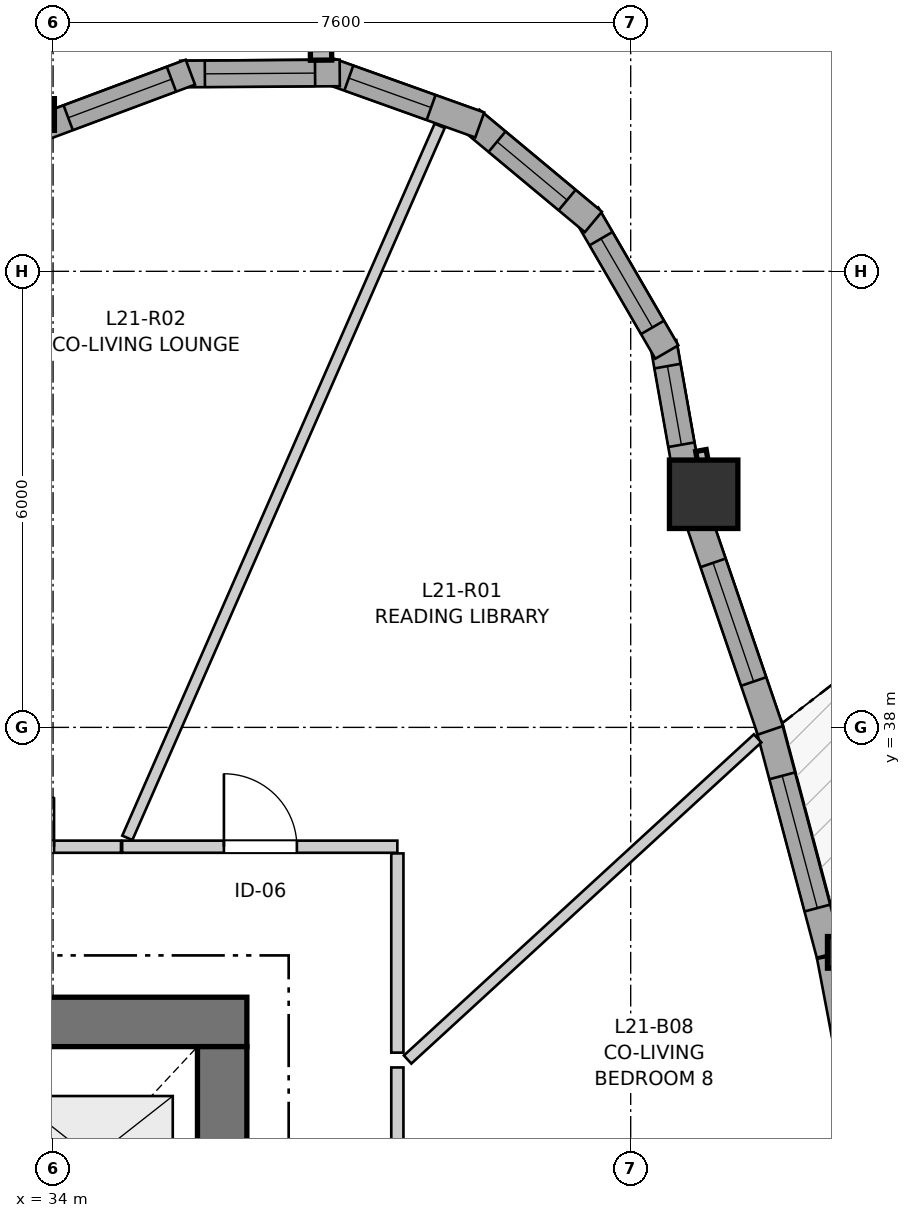
"""IFC4 building model, lengths in metres.
Left out: names, types, materials, properties, quantities, classifications, styles, units other than length and angle.
Written with IfcOpenShell. Run it as: python <this file> out.ifc"""

import sys

from ifc_helpers import new_model, si_unit, direction, frame, frame_2d, origin, origin_2d, place, context, subcontext, project, spatial, rectangle, i_section, extrude, source, transform, mapped, element, fill, save


model = new_model("IFC4")
c1 = context("Model", 3, precision=1e-05, world=origin(), true_north=direction((0.0, 1.0)))
c2 = subcontext(c1, "Body", "Model", "MODEL_VIEW")
j1 = project(units=[si_unit("LENGTHUNIT", "METRE"), si_unit("PLANEANGLEUNIT", "RADIAN")], contexts=[c1])
p1 = place(None, origin())
s1 = spatial("IfcSite", under=j1, at=p1, CompositionType="ELEMENT")
p2 = place(p1, origin())
s2 = spatial("IfcBuilding", under=s1, at=p2, CompositionType="ELEMENT")
p3 = place(p2, frame((0.0, 0.0, 73.6)))
s3 = spatial("IfcBuildingStorey", under=s2, at=p3, CompositionType="ELEMENT", Elevation=73.6)
p4 = place(p3, frame((36.55, 34.125, 0.0), z_axis=(0.0, 0.0, 1.0), x_axis=(-1.0, 0.0, 0.0)))
e1 = element("IfcWall", 1, at=p4, inside=s3, PredefinedType="SHEAR", context=c2, shape_type="SweptSolid", body=[
    extrude(rectangle(XDim=12.4, YDim=0.65, at=frame_2d((6.2, 0.0))), origin(), (0.0, 0.0, 1.0), 2.95),
])
p5 = place(p3, frame((36.225, 18.2, 0.0), z_axis=(0.0, 0.0, 1.0), x_axis=(0.0, 1.0, 0.0)))
e2 = element("IfcWall", 2, at=p5, inside=s3, PredefinedType="SHEAR", context=c2, shape_type="SweptSolid", body=[
    extrude(rectangle(XDim=15.6, YDim=0.65, at=frame_2d((7.8, 0.0))), origin(), (0.0, 0.0, 1.0), 2.95),
])
p6 = place(p5, frame((4.25, 0.0, 0.0)))
e3 = element("IfcOpeningElement", 3, at=p6, cuts=e2, PredefinedType="OPENING", context=c2, shape_type="SweptSolid", body=[
    extrude(rectangle(XDim=1.1, YDim=2.15, at=frame_2d((0.55, 1.075))), frame((0.0, 0.335, 0.0), z_axis=(0.0, -1.0, 0.0), x_axis=(1.0, 0.0, 0.0)), (0.0, 0.0, 1.0), 0.67),
])
p7 = place(p5, frame((10.25, 0.0, 0.0)))
e4 = element("IfcOpeningElement", 4, at=p7, cuts=e2, PredefinedType="OPENING", context=c2, shape_type="SweptSolid", body=[
    extrude(rectangle(XDim=1.1, YDim=2.15, at=frame_2d((0.55, 1.075))), frame((0.0, 0.335, 0.0), z_axis=(0.0, -1.0, 0.0), x_axis=(1.0, 0.0, 0.0)), (0.0, 0.0, 1.0), 0.67),
])
m1 = source(origin(), c2, "Body", "SweptSolid", [
    extrude(i_section(OverallWidth=0.406, OverallDepth=0.416, WebThickness=0.027, FlangeThickness=0.044, FilletRadius=0.015, at=origin_2d()), origin(), (0.0, 0.0, 1.0), 2.95),
])
p8 = place(p3, frame((44.392, 35.04, 0.0), z_axis=(0.0, 0.0, 1.0), x_axis=(1.0, 0.0, 0.0)))
e5 = element("IfcColumn", 5, at=p8, inside=s3, PredefinedType="PILASTER", context=c2, shape_type="MappedRepresentation", body=[
    mapped(m1, transform((0.0, 0.0, 0.0), x_axis=(1.0, 0.0, 0.0), y_axis=(0.0, 1.0, 0.0), z_axis=(0.0, 0.0, 1.0), scale=1.0)),
])
m2 = source(origin(), c2, "Body", "SweptSolid", [
    extrude(rectangle(XDim=0.9, YDim=0.9, at=origin_2d()), origin(), (0.0, 0.0, 1.0), 2.95),
])
p9 = place(p3, frame((42.56, 41.067, 0.0), z_axis=(0.0, 0.0, 1.0), x_axis=(1.0, 0.0, 0.0)))
e6 = element("IfcColumn", 6, at=p9, inside=s3, PredefinedType="COLUMN", context=c2, shape_type="MappedRepresentation", body=[
    mapped(m2, transform((0.0, 0.0, 0.0), x_axis=(1.0, 0.0, 0.0), y_axis=(0.0, 1.0, 0.0), z_axis=(0.0, 0.0, 1.0), scale=1.0)),
])
p10 = place(p3, frame((33.815, 46.063, 0.0), z_axis=(0.0, 0.0, 1.0), x_axis=(1.0, 0.0, 0.0)))
e7 = element("IfcColumn", 7, at=p10, inside=s3, PredefinedType="PILASTER", context=c2, shape_type="MappedRepresentation", body=[
    mapped(m1, transform((0.0, 0.0, 0.0), x_axis=(1.0, 0.0, 0.0), y_axis=(0.0, 1.0, 0.0), z_axis=(0.0, 0.0, 1.0), scale=1.0)),
])
p11 = place(p3, frame((44.8, 31.957, 0.0), z_axis=(0.0, 0.0, 1.0), x_axis=(-0.186672102023, 0.982422274954, 0.0)))
e8 = element("IfcWall", 8, at=p11, inside=s3, PredefinedType="SOLIDWALL", context=c2, shape_type="SweptSolid", body=[
    extrude(rectangle(XDim=3.085, YDim=0.35, at=frame_2d((1.542, 0.0))), origin(), (0.0, 0.0, 1.0), 2.48),
])
p12 = place(p11, frame((0.978, 0.0, 0.82)))
e9 = element("IfcOpeningElement", 9, at=p12, cuts=e8, PredefinedType="OPENING", context=c2, shape_type="SweptSolid", body=[
    extrude(rectangle(XDim=1.15, YDim=1.2, at=frame_2d((0.575, 0.6))), frame((0.0, 0.185, 0.0), z_axis=(0.0, -1.0, 0.0), x_axis=(1.0, 0.0, 0.0)), (0.0, 0.0, 1.0), 0.37),
])
p13 = place(p3, frame((44.218, 35.014, 0.0), z_axis=(0.0, 0.0, 1.0), x_axis=(-0.25705209467, 0.96639754792, 0.0)))
e10 = element("IfcWall", 10, at=p13, inside=s3, PredefinedType="SOLIDWALL", context=c2, shape_type="SweptSolid", body=[
    extrude(rectangle(XDim=3.136, YDim=0.35, at=frame_2d((1.568, 0.0))), origin(), (0.0, 0.0, 1.0), 2.48),
])
p14 = place(p13, frame((0.63, 0.0, 0.82)))
e11 = element("IfcOpeningElement", 11, at=p14, cuts=e10, PredefinedType="OPENING", context=c2, shape_type="SweptSolid", body=[
    extrude(rectangle(XDim=1.8, YDim=1.45, at=frame_2d((0.9, 0.725))), frame((0.0, 0.185, 0.0), z_axis=(0.0, -1.0, 0.0), x_axis=(1.0, 0.0, 0.0)), (0.0, 0.0, 1.0), 0.37),
])
p15 = place(p3, frame((43.437, 37.961, 0.0), z_axis=(0.0, 0.0, 1.0), x_axis=(-0.323572555921, 0.946203361363, 0.0)))
e12 = element("IfcWall", 12, at=p15, inside=s3, PredefinedType="SOLIDWALL", context=c2, shape_type="SweptSolid", body=[
    extrude(rectangle(XDim=2.998, YDim=0.35, at=frame_2d((1.499, 0.0))), origin(), (0.0, 0.0, 1.0), 2.48),
])
p16 = place(p15, frame((0.679, 0.0, 0.82)))
e13 = element("IfcOpeningElement", 13, at=p16, cuts=e12, PredefinedType="OPENING", context=c2, shape_type="SweptSolid", body=[
    extrude(rectangle(XDim=1.65, YDim=1.45, at=frame_2d((0.825, 0.725))), frame((0.0, 0.185, 0.0), z_axis=(0.0, -1.0, 0.0), x_axis=(1.0, 0.0, 0.0)), (0.0, 0.0, 1.0), 0.37),
])
p17 = place(p3, frame((42.348, 41.258, 0.0), z_axis=(0.0, 0.0, 1.0), x_axis=(-0.174331490339, 0.984687022092, 0.0)))
e14 = element("IfcWall", 14, at=p17, inside=s3, PredefinedType="SOLIDWALL", context=c2, shape_type="SweptSolid", body=[
    extrude(rectangle(XDim=1.836, YDim=0.35, at=frame_2d((0.918, 0.0))), origin(), (0.0, 0.0, 1.0), 2.48),
])
p18 = place(p17, frame((0.468, 0.0, 0.82)))
e15 = element("IfcOpeningElement", 15, at=p18, cuts=e14, PredefinedType="OPENING", context=c2, shape_type="SweptSolid", body=[
    extrude(rectangle(XDim=1.05, YDim=1.45, at=frame_2d((0.525, 0.725))), frame((0.0, 0.185, 0.0), z_axis=(0.0, -1.0, 0.0), x_axis=(1.0, 0.0, 0.0)), (0.0, 0.0, 1.0), 0.37),
])
p19 = place(p3, frame((42.075, 42.938, 0.0), z_axis=(0.0, 0.0, 1.0), x_axis=(-0.501902596059, 0.864924149315, 0.0)))
e16 = element("IfcWall", 16, at=p19, inside=s3, PredefinedType="SOLIDWALL", context=c2, shape_type="SweptSolid", body=[
    extrude(rectangle(XDim=2.099, YDim=0.35, at=frame_2d((1.049, 0.0))), origin(), (0.0, 0.0, 1.0), 2.48),
])
p20 = place(p19, frame((0.375, 0.0, 0.82)))
e17 = element("IfcOpeningElement", 17, at=p20, cuts=e16, PredefinedType="OPENING", context=c2, shape_type="SweptSolid", body=[
    extrude(rectangle(XDim=1.35, YDim=1.45, at=frame_2d((0.675, 0.725))), frame((0.0, 0.185, 0.0), z_axis=(0.0, -1.0, 0.0), x_axis=(1.0, 0.0, 0.0)), (0.0, 0.0, 1.0), 0.37),
])
p21 = place(p3, frame((41.109, 44.65, 0.0), z_axis=(0.0, 0.0, 1.0), x_axis=(-0.768450068703, 0.639909752942, 0.0)))
e18 = element("IfcWall", 18, at=p21, inside=s3, PredefinedType="SOLIDWALL", context=c2, shape_type="SweptSolid", body=[
    extrude(rectangle(XDim=2.099, YDim=0.35, at=frame_2d((1.049, 0.0))), origin(), (0.0, 0.0, 1.0), 2.48),
])
p22 = place(p21, frame((0.449, 0.0, 0.82)))
e19 = element("IfcOpeningElement", 19, at=p22, cuts=e18, PredefinedType="OPENING", context=c2, shape_type="SweptSolid", body=[
    extrude(rectangle(XDim=1.2, YDim=1.45, at=frame_2d((0.6, 0.725))), frame((0.0, 0.185, 0.0), z_axis=(0.0, -1.0, 0.0), x_axis=(1.0, 0.0, 0.0)), (0.0, 0.0, 1.0), 0.37),
])
p23 = place(p3, frame((39.614, 45.925, 0.0), z_axis=(0.0, 0.0, 1.0), x_axis=(-0.941486401639, 0.33705096874, 0.0)))
e20 = element("IfcWall", 20, at=p23, inside=s3, PredefinedType="SOLIDWALL", context=c2, shape_type="SweptSolid", body=[
    extrude(rectangle(XDim=2.099, YDim=0.35, at=frame_2d((1.05, 0.0))), origin(), (0.0, 0.0, 1.0), 2.48),
])
p24 = place(p23, frame((0.68, 0.0, 0.82)))
e21 = element("IfcOpeningElement", 21, at=p24, cuts=e20, PredefinedType="OPENING", context=c2, shape_type="SweptSolid", body=[
    extrude(rectangle(XDim=1.15, YDim=1.2, at=frame_2d((0.575, 0.6))), frame((0.0, 0.185, 0.0), z_axis=(0.0, -1.0, 0.0), x_axis=(1.0, 0.0, 0.0)), (0.0, 0.0, 1.0), 0.37),
])
p25 = place(p3, frame((37.772, 46.61, 0.0), z_axis=(0.0, 0.0, 1.0), x_axis=(-0.999976451414, -0.006862697526, 0.0)))
e22 = element("IfcWall", 22, at=p25, inside=s3, PredefinedType="SOLIDWALL", context=c2, shape_type="SweptSolid", body=[
    extrude(rectangle(XDim=2.099, YDim=0.35, at=frame_2d((1.049, 0.0))), origin(), (0.0, 0.0, 1.0), 2.48),
])
p26 = place(p25, frame((0.324, 0.0, 0.82)))
e23 = element("IfcOpeningElement", 23, at=p26, cuts=e22, PredefinedType="OPENING", context=c2, shape_type="SweptSolid", body=[
    extrude(rectangle(XDim=1.45, YDim=1.25, at=frame_2d((0.725, 0.625))), frame((0.0, 0.185, 0.0), z_axis=(0.0, -1.0, 0.0), x_axis=(1.0, 0.0, 0.0)), (0.0, 0.0, 1.0), 0.37),
])
p27 = place(p3, frame((35.806, 46.62, 0.0), z_axis=(0.0, 0.0, 1.0), x_axis=(-0.936863987578, -0.34969396446, 0.0)))
e24 = element("IfcWall", 24, at=p27, inside=s3, PredefinedType="SOLIDWALL", context=c2, shape_type="SweptSolid", body=[
    extrude(rectangle(XDim=2.041, YDim=0.35, at=frame_2d((1.021, 0.0))), origin(), (0.0, 0.0, 1.0), 2.48),
])
p28 = place(p27, frame((0.265, 0.0, 0.82)))
e25 = element("IfcOpeningElement", 25, at=p28, cuts=e24, PredefinedType="OPENING", context=c2, shape_type="SweptSolid", body=[
    extrude(rectangle(XDim=1.45, YDim=1.25, at=frame_2d((0.725, 0.625))), frame((0.0, 0.185, 0.0), z_axis=(0.0, -1.0, 0.0), x_axis=(1.0, 0.0, 0.0)), (0.0, 0.0, 1.0), 0.37),
])
p29 = place(p3, frame((38.53, 33.526, 0.0), z_axis=(0.0, 0.0, 1.0), x_axis=(0.0, -1.0, 0.0)))
e26 = element("IfcWall", 26, at=p29, inside=s3, PredefinedType="PARTITIONING", context=c2, shape_type="SweptSolid", body=[
    extrude(rectangle(XDim=5.472, YDim=0.16, at=frame_2d((2.736, 0.0))), origin(), (0.0, 0.0, 1.0), 2.95),
])
p30 = place(p29, frame((2.278, 0.0, 0.0)))
e27 = element("IfcOpeningElement", 27, at=p30, cuts=e26, PredefinedType="OPENING", context=c2, shape_type="SweptSolid", body=[
    extrude(rectangle(XDim=0.92, YDim=2.1, at=frame_2d((0.46, 1.05))), frame((0.0, 0.09, 0.0), z_axis=(0.0, -1.0, 0.0), x_axis=(1.0, 0.0, 0.0)), (0.0, 0.0, 1.0), 0.18),
])
p31 = place(p3, frame((34.909, 36.43, 0.0), z_axis=(0.0, 0.0, 1.0), x_axis=(1.0, 0.0, 0.0)))
e28 = element("IfcWall", 28, at=p31, inside=s3, PredefinedType="PARTITIONING", context=c2, shape_type="SweptSolid", body=[
    extrude(rectangle(XDim=3.621, YDim=0.16, at=frame_2d((1.811, 0.0))), origin(), (0.0, 0.0, 1.0), 2.588),
])
p32 = place(p31, frame((1.339, 0.0, 0.0)))
e29 = element("IfcOpeningElement", 29, at=p32, cuts=e28, PredefinedType="OPENING", context=c2, shape_type="SweptSolid", body=[
    extrude(rectangle(XDim=0.96, YDim=2.1, at=frame_2d((0.48, 1.05))), frame((0.0, 0.09, 0.0), z_axis=(0.0, -1.0, 0.0), x_axis=(1.0, 0.0, 0.0)), (0.0, 0.0, 1.0), 0.18),
])
p33 = place(p3, frame((31.785, 36.43, 0.0), z_axis=(0.0, 0.0, 1.0), x_axis=(1.0, 0.0, 0.0)))
e30 = element("IfcWall", 30, at=p33, inside=s3, PredefinedType="PARTITIONING", context=c2, shape_type="SweptSolid", body=[
    extrude(rectangle(XDim=3.109, YDim=0.16, at=frame_2d((1.555, 0.0))), origin(), (0.0, 0.0, 1.0), 2.95),
])
p34 = place(p33, frame((0.928, 0.0, 0.0)))
e31 = element("IfcOpeningElement", 31, at=p34, cuts=e30, PredefinedType="OPENING", context=c2, shape_type="SweptSolid", body=[
    extrude(rectangle(XDim=1.3, YDim=2.1, at=frame_2d((0.65, 1.05))), frame((0.0, 0.09, 0.0), z_axis=(0.0, -1.0, 0.0), x_axis=(1.0, 0.0, 0.0)), (0.0, 0.0, 1.0), 0.18),
])
p35 = place(p3, frame((34.977, 36.546, 0.0), z_axis=(0.0, 0.0, 1.0), x_axis=(0.40175384449, 0.915747699117, 0.0)))
e32 = element("IfcWall", 32, at=p35, inside=s3, PredefinedType="PARTITIONING", context=c2, shape_type="SweptSolid", body=[
    extrude(rectangle(XDim=10.23, YDim=0.145, at=frame_2d((5.115, 0.0))), origin(), (0.0, 0.0, 1.0), 2.95),
])
p36 = place(p3, frame((38.665, 33.63, 0.0), z_axis=(0.0, 0.0, 1.0), x_axis=(0.736824900837, 0.676083623161, 0.0)))
e33 = element("IfcWall", 33, at=p36, inside=s3, PredefinedType="PARTITIONING", context=c2, shape_type="SweptSolid", body=[
    extrude(rectangle(XDim=6.25, YDim=0.145, at=frame_2d((3.125, 0.0))), origin(), (0.0, 0.0, 1.0), 2.95),
])
p37 = place(p3, frame((38.53, 33.721, 0.0), z_axis=(0.0, 0.0, 1.0), x_axis=(0.0, 1.0, 0.0)))
e34 = element("IfcWall", 34, at=p37, inside=s3, PredefinedType="PARTITIONING", context=c2, shape_type="SweptSolid", body=[
    extrude(rectangle(XDim=2.621, YDim=0.16, at=frame_2d((1.311, 0.0))), origin(), (0.0, 0.0, 1.0), 2.588),
])
m3 = source(origin(), c2, "Body", "SweptSolid", [
    extrude(rectangle(XDim=1.8, YDim=1.45, at=frame_2d((0.9, 0.725))), frame((0.0, 0.03, 0.0), z_axis=(0.0, -1.0, 0.0), x_axis=(1.0, 0.0, 0.0)), (0.0, 0.0, 1.0), 0.06),
])
p38 = place(p14, origin())
e35 = element("IfcWindow", 35, at=p38, inside=s3, PartitioningType="SINGLE_PANEL", PredefinedType="WINDOW", context=c2, shape_type="MappedRepresentation", body=[
    mapped(m3, transform((0.0, 0.0, 0.0), x_axis=(1.0, 0.0, 0.0), y_axis=(0.0, 1.0, 0.0), z_axis=(0.0, 0.0, 1.0), scale=1.0)),
])
fill(e11, e35)
m4 = source(origin(), c2, "Body", "SweptSolid", [
    extrude(rectangle(XDim=1.65, YDim=1.45, at=frame_2d((0.825, 0.725))), frame((0.0, 0.03, 0.0), z_axis=(0.0, -1.0, 0.0), x_axis=(1.0, 0.0, 0.0)), (0.0, 0.0, 1.0), 0.06),
])
p39 = place(p16, origin())
e36 = element("IfcWindow", 36, at=p39, inside=s3, PartitioningType="SINGLE_PANEL", PredefinedType="WINDOW", context=c2, shape_type="MappedRepresentation", body=[
    mapped(m4, transform((0.0, 0.0, 0.0), x_axis=(1.0, 0.0, 0.0), y_axis=(0.0, 1.0, 0.0), z_axis=(0.0, 0.0, 1.0), scale=1.0)),
])
fill(e13, e36)
m5 = source(origin(), c2, "Body", "SweptSolid", [
    extrude(rectangle(XDim=1.05, YDim=1.45, at=frame_2d((0.525, 0.725))), frame((0.0, 0.03, 0.0), z_axis=(0.0, -1.0, 0.0), x_axis=(1.0, 0.0, 0.0)), (0.0, 0.0, 1.0), 0.06),
])
p40 = place(p18, origin())
e37 = element("IfcWindow", 37, at=p40, inside=s3, PartitioningType="SINGLE_PANEL", PredefinedType="WINDOW", context=c2, shape_type="MappedRepresentation", body=[
    mapped(m5, transform((0.0, 0.0, 0.0), x_axis=(1.0, 0.0, 0.0), y_axis=(0.0, 1.0, 0.0), z_axis=(0.0, 0.0, 1.0), scale=1.0)),
])
fill(e15, e37)
m6 = source(origin(), c2, "Body", "SweptSolid", [
    extrude(rectangle(XDim=1.35, YDim=1.45, at=frame_2d((0.675, 0.725))), frame((0.0, 0.03, 0.0), z_axis=(0.0, -1.0, 0.0), x_axis=(1.0, 0.0, 0.0)), (0.0, 0.0, 1.0), 0.06),
])
p41 = place(p20, origin())
e38 = element("IfcWindow", 38, at=p41, inside=s3, PartitioningType="SINGLE_PANEL", PredefinedType="WINDOW", context=c2, shape_type="MappedRepresentation", body=[
    mapped(m6, transform((0.0, 0.0, 0.0), x_axis=(1.0, 0.0, 0.0), y_axis=(0.0, 1.0, 0.0), z_axis=(0.0, 0.0, 1.0), scale=1.0)),
])
fill(e17, e38)
m7 = source(origin(), c2, "Body", "SweptSolid", [
    extrude(rectangle(XDim=1.2, YDim=1.45, at=frame_2d((0.6, 0.725))), frame((0.0, 0.03, 0.0), z_axis=(0.0, -1.0, 0.0), x_axis=(1.0, 0.0, 0.0)), (0.0, 0.0, 1.0), 0.06),
])
p42 = place(p22, origin())
e39 = element("IfcWindow", 39, at=p42, inside=s3, PartitioningType="SINGLE_PANEL", PredefinedType="WINDOW", context=c2, shape_type="MappedRepresentation", body=[
    mapped(m7, transform((0.0, 0.0, 0.0), x_axis=(1.0, 0.0, 0.0), y_axis=(0.0, 1.0, 0.0), z_axis=(0.0, 0.0, 1.0), scale=1.0)),
])
fill(e19, e39)
m8 = source(origin(), c2, "Body", "SweptSolid", [
    extrude(rectangle(XDim=1.15, YDim=1.2, at=frame_2d((0.575, 0.6))), frame((0.0, 0.03, 0.0), z_axis=(0.0, -1.0, 0.0), x_axis=(1.0, 0.0, 0.0)), (0.0, 0.0, 1.0), 0.06),
])
p43 = place(p24, origin())
e40 = element("IfcWindow", 40, at=p43, inside=s3, PartitioningType="SINGLE_PANEL", PredefinedType="WINDOW", context=c2, shape_type="MappedRepresentation", body=[
    mapped(m8, transform((0.0, 0.0, 0.0), x_axis=(1.0, 0.0, 0.0), y_axis=(0.0, 1.0, 0.0), z_axis=(0.0, 0.0, 1.0), scale=1.0)),
])
fill(e21, e40)
m9 = source(origin(), c2, "Body", "SweptSolid", [
    extrude(rectangle(XDim=1.45, YDim=1.25, at=frame_2d((0.725, 0.625))), frame((0.0, 0.03, 0.0), z_axis=(0.0, -1.0, 0.0), x_axis=(1.0, 0.0, 0.0)), (0.0, 0.0, 1.0), 0.06),
])
p44 = place(p26, origin())
e41 = element("IfcWindow", 41, at=p44, inside=s3, PartitioningType="SINGLE_PANEL", PredefinedType="WINDOW", context=c2, shape_type="MappedRepresentation", body=[
    mapped(m9, transform((0.0, 0.0, 0.0), x_axis=(1.0, 0.0, 0.0), y_axis=(0.0, 1.0, 0.0), z_axis=(0.0, 0.0, 1.0), scale=1.0)),
])
fill(e23, e41)
p45 = place(p28, origin())
e42 = element("IfcWindow", 42, at=p45, inside=s3, PartitioningType="SINGLE_PANEL", PredefinedType="WINDOW", context=c2, shape_type="MappedRepresentation", body=[
    mapped(m9, transform((0.0, 0.0, 0.0), x_axis=(1.0, 0.0, 0.0), y_axis=(0.0, 1.0, 0.0), z_axis=(0.0, 0.0, 1.0), scale=1.0)),
])
fill(e25, e42)
m10 = source(origin(), c2, "Body", "SweptSolid", [
    extrude(rectangle(XDim=0.96, YDim=2.1, at=frame_2d((0.48, 1.05))), frame((0.0, 0.025, 0.0), z_axis=(0.0, -1.0, 0.0), x_axis=(1.0, 0.0, 0.0)), (0.0, 0.0, 1.0), 0.05),
])
p46 = place(p32, origin())
e43 = element("IfcDoor", 43, at=p46, inside=s3, OperationType="SINGLE_SWING_LEFT", PredefinedType="DOOR", context=c2, shape_type="MappedRepresentation", body=[
    mapped(m10, transform((0.0, 0.0, 0.0), x_axis=(1.0, 0.0, 0.0), y_axis=(0.0, 1.0, 0.0), z_axis=(0.0, 0.0, 1.0), scale=1.0)),
])
fill(e29, e43)
m11 = source(origin(), c2, "Body", "SweptSolid", [
    extrude(rectangle(XDim=1.3, YDim=2.1, at=frame_2d((0.65, 1.05))), frame((0.0, 0.025, 0.0), z_axis=(0.0, -1.0, 0.0), x_axis=(1.0, 0.0, 0.0)), (0.0, 0.0, 1.0), 0.05),
])
p47 = place(p34, origin())
e44 = element("IfcDoor", 44, at=p47, inside=s3, OperationType="DOUBLE_DOOR_SINGLE_SWING", PredefinedType="DOOR", context=c2, shape_type="MappedRepresentation", body=[
    mapped(m11, transform((0.0, 0.0, 0.0), x_axis=(1.0, 0.0, 0.0), y_axis=(0.0, 1.0, 0.0), z_axis=(0.0, 0.0, 1.0), scale=1.0)),
])
fill(e31, e44)
save(model, sys.argv[1])
